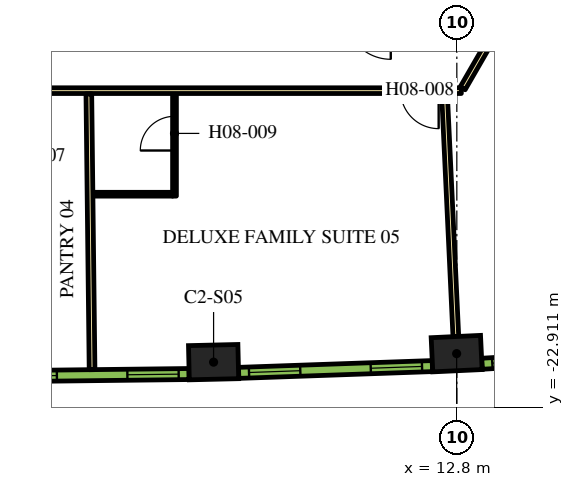
"""IFC4 building model, lengths in metres.
Left out: names, types, materials, properties, quantities, classifications, styles, units other than length and angle.
Written with IfcOpenShell. Run it as: python <this file> out.ifc"""

import sys

from ifc_helpers import new_model, si_unit, direction, frame, frame_2d, origin, origin_2d, place, context, subcontext, project, spatial, rectangle, extrude, element, fill, save


model = new_model("IFC4")
c1 = context("Model", 3, precision=1e-05, world=origin(), true_north=direction((0.0, 1.0)))
c2 = subcontext(c1, "Body", "Model", "MODEL_VIEW")
j1 = project(units=[si_unit("LENGTHUNIT", "METRE"), si_unit("PLANEANGLEUNIT", "RADIAN")], contexts=[c1])
p1 = place(None, origin())
s1 = spatial("IfcSite", under=j1, at=p1, CompositionType="ELEMENT")
p2 = place(p1, origin())
s2 = spatial("IfcBuilding", under=s1, at=p2, CompositionType="ELEMENT")
p3 = place(p2, frame((0.0, 0.0, 107.1)))
s3 = spatial("IfcBuildingStorey", under=s2, at=p3, CompositionType="ELEMENT", Elevation=107.1)
for number, where, z_axis, x_axis in (
    (1, (6.399, -21.719, 0.0), (0.0, 0.0, 1.0), (1.0, 0.023, 0.0)),
    (2, (12.795, -21.494, 0.0), (0.0, 0.0, 1.0), (0.999, 0.047, 0.0)),
):
    element("IfcColumn", number, at=place(p3, frame(where, z_axis=z_axis, x_axis=x_axis)), inside=s3, PredefinedType="COLUMN", context=c2, shape_type="SweptSolid", body=[
        extrude(rectangle(XDim=1.3, YDim=0.9, at=origin_2d()), origin(), (0.0, 0.0, 1.0), 3.9),
    ])
p4 = place(p3, frame((12.918, -14.575, 0.0), z_axis=(0.0, 0.0, 1.0), x_axis=(-1.0, 0.0, 0.0)))
e3 = element("IfcWall", 3, at=p4, inside=s3, PredefinedType="PARTITIONING", context=c2, shape_type="SweptSolid", body=[
    extrude(rectangle(XDim=25.766, YDim=0.15, at=frame_2d((12.883, 0.0))), origin(), (0.0, 0.0, 1.0), 2.75),
])
p5 = place(p4, frame((24.586, 0.0, 0.0)))
e4 = element("IfcOpeningElement", 4, at=p5, cuts=e3, PredefinedType="OPENING", context=c2, shape_type="SweptSolid", body=[
    extrude(rectangle(XDim=1.0, YDim=2.1, at=frame_2d((0.5, 1.05))), frame((0.0, 0.085, 0.0), z_axis=(0.0, -1.0, 0.0), x_axis=(1.0, 0.0, 0.0)), (0.0, 0.0, 1.0), 0.17),
])
p6 = place(p4, frame((13.144, 0.0, 0.0)))
e5 = element("IfcOpeningElement", 5, at=p6, cuts=e3, PredefinedType="OPENING", context=c2, shape_type="SweptSolid", body=[
    extrude(rectangle(XDim=1.0, YDim=2.1, at=frame_2d((0.5, 1.05))), frame((0.0, 0.085, 0.0), z_axis=(0.0, -1.0, 0.0), x_axis=(1.0, 0.0, 0.0)), (0.0, 0.0, 1.0), 0.17),
])
p7 = place(p4, frame((10.874, 0.0, 0.0)))
e6 = element("IfcOpeningElement", 6, at=p7, cuts=e3, PredefinedType="OPENING", context=c2, shape_type="SweptSolid", body=[
    extrude(rectangle(XDim=0.9, YDim=2.1, at=frame_2d((0.45, 1.05))), frame((0.0, 0.085, 0.0), z_axis=(0.0, -1.0, 0.0), x_axis=(1.0, 0.0, 0.0)), (0.0, 0.0, 1.0), 0.17),
])
p8 = place(p4, frame((0.596, 0.0, 0.0)))
e7 = element("IfcOpeningElement", 7, at=p8, cuts=e3, PredefinedType="OPENING", context=c2, shape_type="SweptSolid", body=[
    extrude(rectangle(XDim=1.0, YDim=2.1, at=frame_2d((0.5, 1.05))), frame((0.0, 0.085, 0.0), z_axis=(0.0, -1.0, 0.0), x_axis=(1.0, 0.0, 0.0)), (0.0, 0.0, 1.0), 0.17),
])
p9 = place(p3, frame((15.587, -9.952, 0.0), z_axis=(0.0, 0.0, 1.0), x_axis=(-0.500016618951, -0.866015808616, 0.0)))
e8 = element("IfcWall", 8, at=p9, inside=s3, PredefinedType="PARTITIONING", context=c2, shape_type="SweptSolid", body=[
    extrude(rectangle(XDim=5.268, YDim=0.15, at=frame_2d((2.634, 0.0))), origin(), (0.0, 0.0, 1.0), 2.75),
])
p10 = place(p3, frame((3.202, -21.916, 0.0), z_axis=(0.0, 0.0, 1.0), x_axis=(-0.011707696285, 0.999931462575, 0.0)))
e9 = element("IfcWall", 9, at=p10, inside=s3, PredefinedType="PARTITIONING", context=c2, shape_type="SweptSolid", body=[
    extrude(rectangle(XDim=7.257, YDim=0.15, at=frame_2d((3.628, 0.0))), origin(), (0.0, 0.0, 1.0), 2.75),
])
p11 = place(p3, frame((12.774, -21.045, 0.0), z_axis=(0.0, 0.0, 1.0), x_axis=(-0.046750341626, 0.998906605023, 0.0)))
e10 = element("IfcWall", 10, at=p11, inside=s3, PredefinedType="PARTITIONING", context=c2, shape_type="SweptSolid", body=[
    extrude(rectangle(XDim=6.392, YDim=0.15, at=frame_2d((3.196, 0.0))), origin(), (0.0, 0.0, 1.0), 2.75),
])
p12 = place(p3, frame((5.371, -17.35, 0.0), z_axis=(0.0, 0.0, 1.0), x_axis=(0.0, 1.0, 0.0)))
e11 = element("IfcWall", 11, at=p12, inside=s3, PredefinedType="PARTITIONING", context=c2, shape_type="SweptSolid", body=[
    extrude(rectangle(XDim=2.7, YDim=0.1, at=frame_2d((1.35, 0.0))), origin(), (0.0, 0.0, 1.0), 2.75),
])
p13 = place(p12, frame((1.2, 0.0, 0.0)))
e12 = element("IfcOpeningElement", 12, at=p13, cuts=e11, PredefinedType="OPENING", context=c2, shape_type="SweptSolid", body=[
    extrude(rectangle(XDim=0.9, YDim=2.1, at=frame_2d((0.45, 1.05))), frame((0.0, 0.06, 0.0), z_axis=(0.0, -1.0, 0.0), x_axis=(1.0, 0.0, 0.0)), (0.0, 0.0, 1.0), 0.12),
])
p14 = place(p3, frame((5.321, -17.3, 0.0), z_axis=(0.0, 0.0, 1.0), x_axis=(-1.0, 0.0, 0.0)))
e13 = element("IfcWall", 13, at=p14, inside=s3, PredefinedType="PARTITIONING", context=c2, shape_type="SweptSolid", body=[
    extrude(rectangle(XDim=2.09, YDim=0.1, at=frame_2d((1.045, 0.0))), origin(), (0.0, 0.0, 1.0), 2.75),
])
p15 = place(p3, frame((0.653, -22.091, 0.0), z_axis=(0.0, 0.0, 1.0), x_axis=(0.999931786565, 0.011679992145, 0.0)))
e14 = element("IfcWall", 14, at=p15, inside=s3, PredefinedType="SOLIDWALL", context=c2, shape_type="SweptSolid", body=[
    extrude(rectangle(XDim=5.1, YDim=0.29, at=frame_2d((2.55, 0.0))), origin(), (0.0, 0.0, 1.0), 3.65),
])
p16 = place(p15, frame((0.273, 0.0, 0.9)))
e15 = element("IfcOpeningElement", 15, at=p16, cuts=e14, PredefinedType="OPENING", context=c2, shape_type="SweptSolid", body=[
    extrude(rectangle(XDim=1.35, YDim=2.15, at=frame_2d((0.675, 1.075))), frame((0.0, 0.155, 0.0), z_axis=(0.0, -1.0, 0.0), x_axis=(1.0, 0.0, 0.0)), (0.0, 0.0, 1.0), 0.31),
])
p17 = place(p15, frame((3.478, 0.0, 0.9)))
e16 = element("IfcOpeningElement", 16, at=p17, cuts=e14, PredefinedType="OPENING", context=c2, shape_type="SweptSolid", body=[
    extrude(rectangle(XDim=1.35, YDim=2.15, at=frame_2d((0.675, 1.075))), frame((0.0, 0.155, 0.0), z_axis=(0.0, -1.0, 0.0), x_axis=(1.0, 0.0, 0.0)), (0.0, 0.0, 1.0), 0.31),
])
p18 = place(p3, frame((7.059, -22.001, 0.0), z_axis=(0.0, 0.0, 1.0), x_axis=(0.999385993957, 0.035037623812, 0.0)))
e17 = element("IfcWall", 17, at=p18, inside=s3, PredefinedType="SOLIDWALL", context=c2, shape_type="SweptSolid", body=[
    extrude(rectangle(XDim=5.101, YDim=0.29, at=frame_2d((2.55, 0.0))), origin(), (0.0, 0.0, 1.0), 3.65),
])
p19 = place(p18, frame((0.273, 0.0, 0.9)))
e18 = element("IfcOpeningElement", 18, at=p19, cuts=e17, PredefinedType="OPENING", context=c2, shape_type="SweptSolid", body=[
    extrude(rectangle(XDim=1.35, YDim=2.15, at=frame_2d((0.675, 1.075))), frame((0.0, 0.155, 0.0), z_axis=(0.0, -1.0, 0.0), x_axis=(1.0, 0.0, 0.0)), (0.0, 0.0, 1.0), 0.31),
])
p20 = place(p18, frame((3.478, 0.0, 0.9)))
e19 = element("IfcOpeningElement", 19, at=p20, cuts=e17, PredefinedType="OPENING", context=c2, shape_type="SweptSolid", body=[
    extrude(rectangle(XDim=1.35, YDim=2.15, at=frame_2d((0.675, 1.075))), frame((0.0, 0.155, 0.0), z_axis=(0.0, -1.0, 0.0), x_axis=(1.0, 0.0, 0.0)), (0.0, 0.0, 1.0), 0.31),
])
p21 = place(p3, frame((13.462, -21.761, 0.0), z_axis=(0.0, 0.0, 1.0), x_axis=(0.998290511436, 0.058447025388, 0.0)))
e20 = element("IfcWall", 20, at=p21, inside=s3, PredefinedType="SOLIDWALL", context=c2, shape_type="SweptSolid", body=[
    extrude(rectangle(XDim=5.1, YDim=0.29, at=frame_2d((2.55, 0.0))), origin(), (0.0, 0.0, 1.0), 3.65),
])
p22 = place(p21, frame((0.272, 0.0, 0.9)))
e21 = element("IfcOpeningElement", 21, at=p22, cuts=e20, PredefinedType="OPENING", context=c2, shape_type="SweptSolid", body=[
    extrude(rectangle(XDim=1.35, YDim=2.15, at=frame_2d((0.675, 1.075))), frame((0.0, 0.155, 0.0), z_axis=(0.0, -1.0, 0.0), x_axis=(1.0, 0.0, 0.0)), (0.0, 0.0, 1.0), 0.31),
])
p23 = place(p21, frame((3.478, 0.0, 0.9)))
e22 = element("IfcOpeningElement", 22, at=p23, cuts=e20, PredefinedType="OPENING", context=c2, shape_type="SweptSolid", body=[
    extrude(rectangle(XDim=1.35, YDim=2.15, at=frame_2d((0.675, 1.075))), frame((0.0, 0.155, 0.0), z_axis=(0.0, -1.0, 0.0), x_axis=(1.0, 0.0, 0.0)), (0.0, 0.0, 1.0), 0.31),
])
p24 = place(p8, origin())
e23 = element("IfcDoor", 23, at=p24, inside=s3, OperationType="SINGLE_SWING_LEFT", PredefinedType="DOOR", context=c2, shape_type="SweptSolid", body=[
    extrude(rectangle(XDim=1.0, YDim=2.1, at=frame_2d((0.5, 1.05))), frame((0.0, 0.025, 0.0), z_axis=(0.0, -1.0, 0.0), x_axis=(1.0, 0.0, 0.0)), (0.0, 0.0, 1.0), 0.05),
])
fill(e7, e23)
p25 = place(p13, origin())
e24 = element("IfcDoor", 24, at=p25, inside=s3, OperationType="SINGLE_SWING_LEFT", PredefinedType="DOOR", context=c2, shape_type="SweptSolid", body=[
    extrude(rectangle(XDim=0.9, YDim=2.1, at=frame_2d((0.45, 1.05))), frame((0.0, 0.025, 0.0), z_axis=(0.0, -1.0, 0.0), x_axis=(1.0, 0.0, 0.0)), (0.0, 0.0, 1.0), 0.05),
])
fill(e12, e24)
p26 = place(p16, origin())
e25 = element("IfcWindow", 25, at=p26, inside=s3, PartitioningType="DOUBLE_PANEL_VERTICAL", PredefinedType="WINDOW", context=c2, shape_type="SweptSolid", body=[
    extrude(rectangle(XDim=1.35, YDim=2.15, at=frame_2d((0.675, 1.075))), frame((0.0, 0.015, 0.0), z_axis=(0.0, -1.0, 0.0), x_axis=(1.0, 0.0, 0.0)), (0.0, 0.0, 1.0), 0.06),
])
fill(e15, e25)
p27 = place(p17, origin())
e26 = element("IfcWindow", 26, at=p27, inside=s3, PartitioningType="DOUBLE_PANEL_VERTICAL", PredefinedType="WINDOW", context=c2, shape_type="SweptSolid", body=[
    extrude(rectangle(XDim=1.35, YDim=2.15, at=frame_2d((0.675, 1.075))), frame((0.0, 0.015, 0.0), z_axis=(0.0, -1.0, 0.0), x_axis=(1.0, 0.0, 0.0)), (0.0, 0.0, 1.0), 0.06),
])
fill(e16, e26)
p28 = place(p19, origin())
e27 = element("IfcWindow", 27, at=p28, inside=s3, PartitioningType="DOUBLE_PANEL_VERTICAL", PredefinedType="WINDOW", context=c2, shape_type="SweptSolid", body=[
    extrude(rectangle(XDim=1.35, YDim=2.15, at=frame_2d((0.675, 1.075))), frame((0.0, 0.015, 0.0), z_axis=(0.0, -1.0, 0.0), x_axis=(1.0, 0.0, 0.0)), (0.0, 0.0, 1.0), 0.06),
])
fill(e18, e27)
p29 = place(p20, origin())
e28 = element("IfcWindow", 28, at=p29, inside=s3, PartitioningType="DOUBLE_PANEL_VERTICAL", PredefinedType="WINDOW", context=c2, shape_type="SweptSolid", body=[
    extrude(rectangle(XDim=1.35, YDim=2.15, at=frame_2d((0.675, 1.075))), frame((0.0, 0.015, 0.0), z_axis=(0.0, -1.0, 0.0), x_axis=(1.0, 0.0, 0.0)), (0.0, 0.0, 1.0), 0.06),
])
fill(e19, e28)
p30 = place(p22, origin())
e29 = element("IfcWindow", 29, at=p30, inside=s3, PartitioningType="DOUBLE_PANEL_VERTICAL", PredefinedType="WINDOW", context=c2, shape_type="SweptSolid", body=[
    extrude(rectangle(XDim=1.35, YDim=2.15, at=frame_2d((0.675, 1.075))), frame((0.0, 0.015, 0.0), z_axis=(0.0, -1.0, 0.0), x_axis=(1.0, 0.0, 0.0)), (0.0, 0.0, 1.0), 0.06),
])
fill(e21, e29)
save(model, sys.argv[1])
